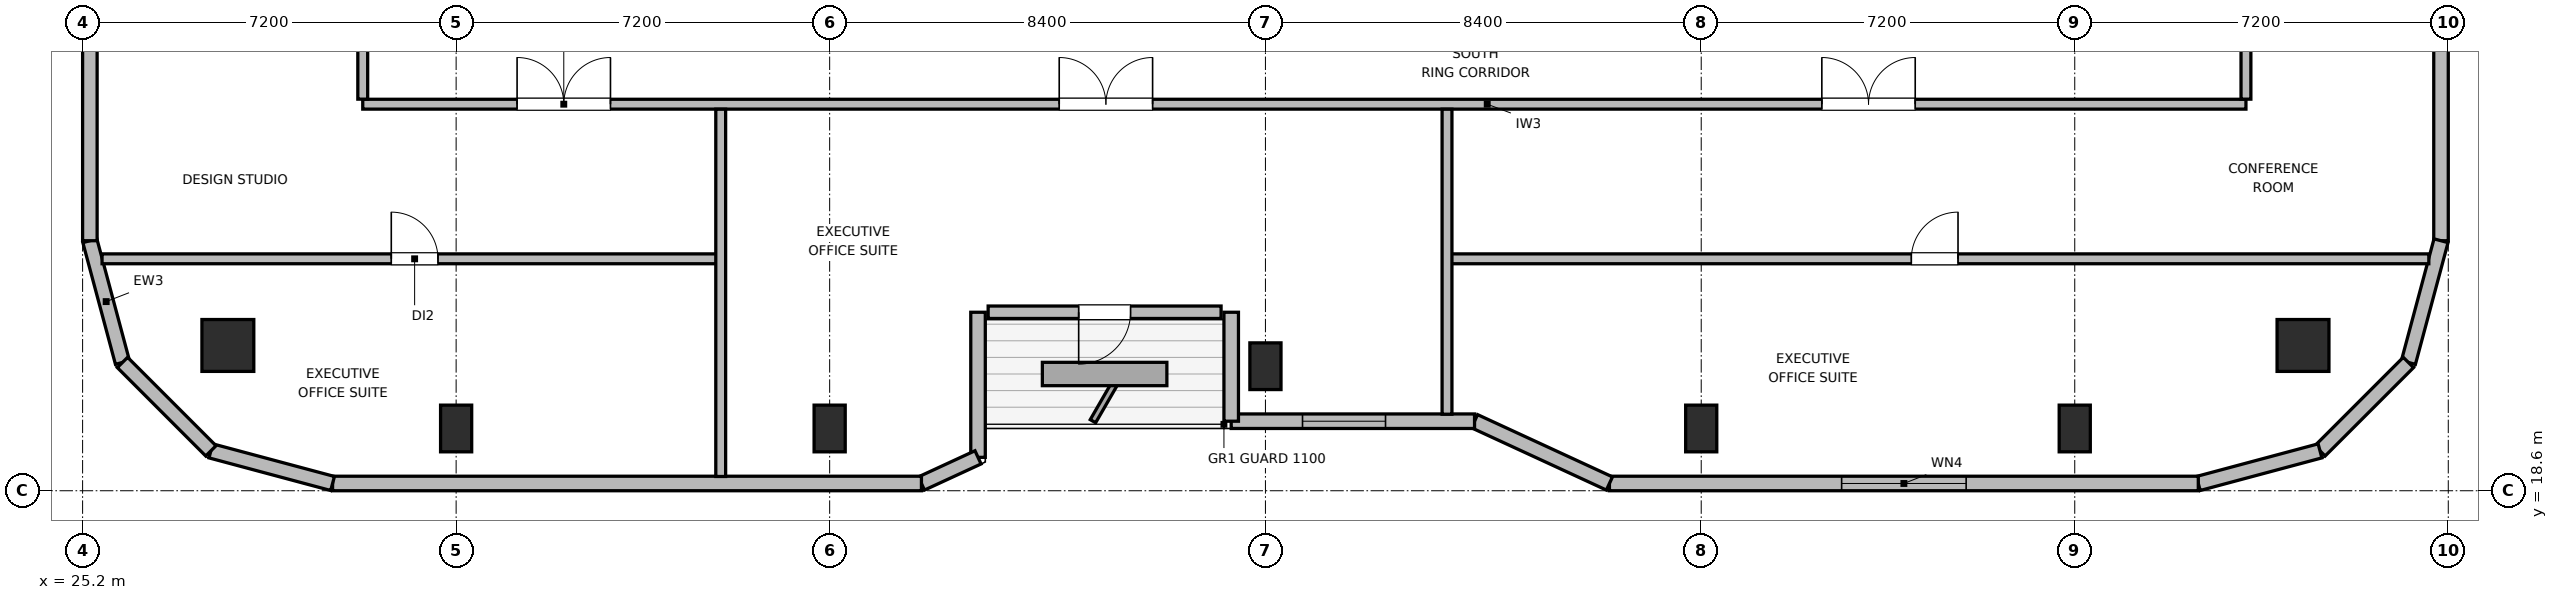
"""IFC4 building model, lengths in metres.
Left out: names, types, materials, properties, quantities, classifications, styles, units other than length and angle.
Written with IfcOpenShell. Run it as: python <this file> out.ifc"""

import sys

from ifc_helpers import new_model, si_unit, direction, frame, frame_2d, origin, origin_2d, place, context, subcontext, project, spatial, rectangle, circle, extrude, element, fill, save


model = new_model("IFC4")
c1 = context("Model", 3, precision=1e-05, world=origin(), true_north=direction((0.0, 1.0)))
c2 = subcontext(c1, "Body", "Model", "MODEL_VIEW")
j1 = project(units=[si_unit("LENGTHUNIT", "METRE"), si_unit("PLANEANGLEUNIT", "RADIAN")], contexts=[c1])
p1 = place(None, origin())
s1 = spatial("IfcSite", under=j1, at=p1, CompositionType="ELEMENT")
p2 = place(p1, origin())
s2 = spatial("IfcBuilding", under=s1, at=p2, CompositionType="ELEMENT")
p3 = place(p2, frame((0.0, 0.0, 325.8)))
s3 = spatial("IfcBuildingStorey", under=s2, at=p3, CompositionType="ELEMENT", Elevation=325.8)
for number, where, z_axis, x_axis in (
    (1, (28.0, 21.4, 0.0), (0.0, 0.0, 1.0), (1.0, 0.0, 0.0)),
    (2, (68.0, 21.4, 0.0), (0.0, 0.0, 1.0), (1.0, 0.0, 0.0)),
):
    element("IfcColumn", number, at=place(p3, frame(where, z_axis=z_axis, x_axis=x_axis)), inside=s3, PredefinedType="COLUMN", context=c2, shape_type="SweptSolid", body=[
        extrude(circle(Radius=0.5, at=origin_2d()), origin(), (0.0, 0.0, 1.0), 3.9),
    ])
for number, where, z_axis, x_axis in (
    (3, (32.4, 19.8, 0.0), (0.0, 0.0, 1.0), (1.0, 0.0, 0.0)),
    (4, (39.6, 19.8, 0.0), (0.0, 0.0, 1.0), (1.0, 0.0, 0.0)),
    (5, (48.0, 21.0, 0.0), (0.0, 0.0, 1.0), (1.0, 0.0, 0.0)),
    (6, (56.4, 19.8, 0.0), (0.0, 0.0, 1.0), (1.0, 0.0, 0.0)),
    (7, (63.6, 19.8, 0.0), (0.0, 0.0, 1.0), (1.0, 0.0, 0.0)),
):
    element("IfcColumn", number, at=place(p3, frame(where, z_axis=z_axis, x_axis=x_axis)), inside=s3, PredefinedType="COLUMN", context=c2, shape_type="SweptSolid", body=[
        extrude(rectangle(XDim=0.6, YDim=0.9, at=origin_2d()), origin(), (0.0, 0.0, 1.0), 3.9),
    ])
p4 = place(p3, frame((25.969, 21.073, 0.0), z_axis=(0.0, 0.0, 1.0), x_axis=(-0.258751159445, 0.965944013639, 0.0)))
e8 = element("IfcWall", 8, at=p4, inside=s3, PredefinedType="SOLIDWALL", context=c2, shape_type="SweptSolid", body=[
    extrude(rectangle(XDim=2.429, YDim=0.28, at=frame_2d((1.214, 0.0))), origin(), (0.0, 0.0, 1.0), 3.68),
])
p5 = place(p3, frame((25.34, 23.418, 0.0), z_axis=(0.0, 0.0, 1.0), x_axis=(0.0, 1.0, 0.0)))
e9 = element("IfcWall", 9, at=p5, inside=s3, PredefinedType="SOLIDWALL", context=c2, shape_type="SweptSolid", body=[
    extrude(rectangle(XDim=5.842, YDim=0.28, at=frame_2d((2.921, 0.0))), origin(), (0.0, 0.0, 1.0), 3.68),
])
p6 = place(p3, frame((70.66, 37.66, 0.0), z_axis=(0.0, 0.0, 1.0), x_axis=(0.0, -1.0, 0.0)))
e10 = element("IfcWall", 10, at=p6, inside=s3, PredefinedType="SOLIDWALL", context=c2, shape_type="SweptSolid", body=[
    extrude(rectangle(XDim=14.241, YDim=0.28, at=frame_2d((7.121, 0.0))), origin(), (0.0, 0.0, 1.0), 3.68),
])
p7 = place(p6, frame((6.456, 0.0, 0.85)))
e11 = element("IfcOpeningElement", 11, at=p7, cuts=e10, PredefinedType="OPENING", context=c2, shape_type="SweptSolid", body=[
    extrude(rectangle(XDim=1.6, YDim=1.0, at=frame_2d((0.8, 0.5))), frame((0.0, 0.15, 0.0), z_axis=(0.0, -1.0, 0.0), x_axis=(1.0, 0.0, 0.0)), (0.0, 0.0, 1.0), 0.3),
])
p8 = place(p3, frame((70.66, 23.418, 0.0), z_axis=(0.0, 0.0, 1.0), x_axis=(-0.258751159445, -0.965944013639, 0.0)))
e12 = element("IfcWall", 12, at=p8, inside=s3, PredefinedType="SOLIDWALL", context=c2, shape_type="SweptSolid", body=[
    extrude(rectangle(XDim=2.429, YDim=0.28, at=frame_2d((1.214, 0.0))), origin(), (0.0, 0.0, 1.0), 3.68),
])
p9 = place(p3, frame((70.031, 21.073, 0.0), z_axis=(0.0, 0.0, 1.0), x_axis=(-0.707106781187, -0.707106781187, 0.0)))
e13 = element("IfcWall", 13, at=p9, inside=s3, PredefinedType="SOLIDWALL", context=c2, shape_type="SweptSolid", body=[
    extrude(rectangle(XDim=2.41, YDim=0.28, at=frame_2d((1.205, 0.0))), origin(), (0.0, 0.0, 1.0), 3.68),
])
p10 = place(p3, frame((68.327, 19.368, 0.0), z_axis=(0.0, 0.0, 1.0), x_axis=(-0.965937282298, -0.25877628691, 0.0)))
e14 = element("IfcWall", 14, at=p10, inside=s3, PredefinedType="SOLIDWALL", context=c2, shape_type="SweptSolid", body=[
    extrude(rectangle(XDim=2.428, YDim=0.28, at=frame_2d((1.214, 0.0))), origin(), (0.0, 0.0, 1.0), 3.68),
])
p11 = place(p3, frame((65.982, 18.74, 0.0), z_axis=(0.0, 0.0, 1.0), x_axis=(-1.0, 0.0, 0.0)))
e15 = element("IfcWall", 15, at=p11, inside=s3, PredefinedType="SOLIDWALL", context=c2, shape_type="SweptSolid", body=[
    extrude(rectangle(XDim=11.351, YDim=0.28, at=frame_2d((5.676, 0.0))), origin(), (0.0, 0.0, 1.0), 3.68),
])
p12 = place(p11, frame((4.475, 0.0, 0.85)))
e16 = element("IfcOpeningElement", 16, at=p12, cuts=e15, PredefinedType="OPENING", context=c2, shape_type="SweptSolid", body=[
    extrude(rectangle(XDim=2.4, YDim=1.15, at=frame_2d((1.2, 0.575))), frame((0.0, 0.15, 0.0), z_axis=(0.0, -1.0, 0.0), x_axis=(1.0, 0.0, 0.0)), (0.0, 0.0, 1.0), 0.3),
])
p13 = place(p3, frame((54.631, 18.74, 0.0), z_axis=(0.0, 0.0, 1.0), x_axis=(-0.907956889006, 0.419063584324, 0.0)))
e17 = element("IfcWall", 17, at=p13, inside=s3, PredefinedType="SOLIDWALL", context=c2, shape_type="SweptSolid", body=[
    extrude(rectangle(XDim=2.864, YDim=0.28, at=frame_2d((1.432, 0.0))), origin(), (0.0, 0.0, 1.0), 2.265),
])
p14 = place(p3, frame((52.031, 19.94, 0.0), z_axis=(0.0, 0.0, 1.0), x_axis=(-1.0, 0.0, 0.0)))
e18 = element("IfcWall", 18, at=p14, inside=s3, PredefinedType="SOLIDWALL", context=c2, shape_type="SweptSolid", body=[
    extrude(rectangle(XDim=4.691, YDim=0.28, at=frame_2d((2.345, 0.0))), origin(), (0.0, 0.0, 1.0), 2.265),
])
p15 = place(p14, frame((1.716, 0.0, 0.85)))
e19 = element("IfcOpeningElement", 19, at=p15, cuts=e18, PredefinedType="OPENING", context=c2, shape_type="SweptSolid", body=[
    extrude(rectangle(XDim=1.6, YDim=1.0, at=frame_2d((0.8, 0.5))), frame((0.0, 0.15, 0.0), z_axis=(0.0, -1.0, 0.0), x_axis=(1.0, 0.0, 0.0)), (0.0, 0.0, 1.0), 0.3),
])
p16 = place(p3, frame((47.34, 19.94, 0.0), z_axis=(0.0, 0.0, 1.0), x_axis=(0.0, 1.0, 0.0)))
e20 = element("IfcWall", 20, at=p16, inside=s3, PredefinedType="SOLIDWALL", context=c2, shape_type="SweptSolid", body=[
    extrude(rectangle(XDim=2.1, YDim=0.28, at=frame_2d((1.05, 0.0))), origin(), (0.0, 0.0, 1.0), 2.265),
])
p17 = place(p3, frame((47.145, 22.04, 0.0), z_axis=(0.0, 0.0, 1.0), x_axis=(-1.0, 0.0, 0.0)))
e21 = element("IfcWall", 21, at=p17, inside=s3, PredefinedType="SOLIDWALL", context=c2, shape_type="SweptSolid", body=[
    extrude(rectangle(XDim=4.49, YDim=0.24, at=frame_2d((2.245, 0.0))), origin(), (0.0, 0.0, 1.0), 3.68),
])
p18 = place(p17, frame((1.745, 0.0, 0.0)))
e22 = element("IfcOpeningElement", 22, at=p18, cuts=e21, PredefinedType="OPENING", context=c2, shape_type="SweptSolid", body=[
    extrude(rectangle(XDim=1.0, YDim=2.02, at=frame_2d((0.5, 1.01))), frame((0.0, 0.13, 0.0), z_axis=(0.0, -1.0, 0.0), x_axis=(1.0, 0.0, 0.0)), (0.0, 0.0, 1.0), 0.26),
])
p19 = place(p3, frame((42.46, 22.04, 0.0), z_axis=(0.0, 0.0, 1.0), x_axis=(0.0, -1.0, 0.0)))
e23 = element("IfcWall", 23, at=p19, inside=s3, PredefinedType="SOLIDWALL", context=c2, shape_type="SweptSolid", body=[
    extrude(rectangle(XDim=2.796, YDim=0.28, at=frame_2d((1.398, 0.0))), origin(), (0.0, 0.0, 1.0), 2.265),
])
p20 = place(p3, frame((42.46, 19.244, 0.0), z_axis=(0.0, 0.0, 1.0), x_axis=(-0.907893953211, -0.419199916176, 0.0)))
e24 = element("IfcWall", 24, at=p20, inside=s3, PredefinedType="SOLIDWALL", context=c2, shape_type="SweptSolid", body=[
    extrude(rectangle(XDim=1.201, YDim=0.28, at=frame_2d((0.601, 0.0))), origin(), (0.0, 0.0, 1.0), 3.68),
])
p21 = place(p3, frame((41.369, 18.74, 0.0), z_axis=(0.0, 0.0, 1.0), x_axis=(-1.0, 0.0, 0.0)))
e25 = element("IfcWall", 25, at=p21, inside=s3, PredefinedType="SOLIDWALL", context=c2, shape_type="SweptSolid", body=[
    extrude(rectangle(XDim=11.351, YDim=0.28, at=frame_2d((5.675, 0.0))), origin(), (0.0, 0.0, 1.0), 3.68),
])
p22 = place(p3, frame((30.018, 18.74, 0.0), z_axis=(0.0, 0.0, 1.0), x_axis=(-0.965937282298, 0.25877628691, 0.0)))
e26 = element("IfcWall", 26, at=p22, inside=s3, PredefinedType="SOLIDWALL", context=c2, shape_type="SweptSolid", body=[
    extrude(rectangle(XDim=2.428, YDim=0.28, at=frame_2d((1.214, 0.0))), origin(), (0.0, 0.0, 1.0), 3.68),
])
p23 = place(p3, frame((27.673, 19.368, 0.0), z_axis=(0.0, 0.0, 1.0), x_axis=(-0.707106781187, 0.707106781187, 0.0)))
e27 = element("IfcWall", 27, at=p23, inside=s3, PredefinedType="SOLIDWALL", context=c2, shape_type="SweptSolid", body=[
    extrude(rectangle(XDim=2.41, YDim=0.28, at=frame_2d((1.205, 0.0))), origin(), (0.0, 0.0, 1.0), 3.68),
])
p24 = place(p3, frame((30.6, 26.05, 0.0), z_axis=(0.0, 0.0, 1.0), x_axis=(1.0, 0.0, 0.0)))
e28 = element("IfcWall", 28, at=p24, inside=s3, PredefinedType="PLUMBINGWALL", context=c2, shape_type="SweptSolid", body=[
    extrude(rectangle(XDim=36.3, YDim=0.19, at=frame_2d((18.15, 0.0))), origin(), (0.0, 0.0, 1.0), 3.68),
])
p25 = place(p24, frame((2.975, 0.0, 0.0)))
e29 = element("IfcOpeningElement", 29, at=p25, cuts=e28, PredefinedType="OPENING", context=c2, shape_type="SweptSolid", body=[
    extrude(rectangle(XDim=1.8, YDim=2.06, at=frame_2d((0.9, 1.03))), frame((0.0, 0.105, 0.0), z_axis=(0.0, -1.0, 0.0), x_axis=(1.0, 0.0, 0.0)), (0.0, 0.0, 1.0), 0.21),
])
p26 = place(p24, frame((13.425, 0.0, 0.0)))
e30 = element("IfcOpeningElement", 30, at=p26, cuts=e28, PredefinedType="OPENING", context=c2, shape_type="SweptSolid", body=[
    extrude(rectangle(XDim=1.8, YDim=2.06, at=frame_2d((0.9, 1.03))), frame((0.0, 0.105, 0.0), z_axis=(0.0, -1.0, 0.0), x_axis=(1.0, 0.0, 0.0)), (0.0, 0.0, 1.0), 0.21),
])
p27 = place(p24, frame((28.125, 0.0, 0.0)))
e31 = element("IfcOpeningElement", 31, at=p27, cuts=e28, PredefinedType="OPENING", context=c2, shape_type="SweptSolid", body=[
    extrude(rectangle(XDim=1.8, YDim=2.06, at=frame_2d((0.9, 1.03))), frame((0.0, 0.105, 0.0), z_axis=(0.0, -1.0, 0.0), x_axis=(1.0, 0.0, 0.0)), (0.0, 0.0, 1.0), 0.21),
])
p28 = place(p3, frame((30.6, 26.147, 0.0), z_axis=(0.0, 0.0, 1.0), x_axis=(0.0, 1.0, 0.0)))
e32 = element("IfcWall", 32, at=p28, inside=s3, PredefinedType="PLUMBINGWALL", context=c2, shape_type="SweptSolid", body=[
    extrude(rectangle(XDim=19.706, YDim=0.19, at=frame_2d((9.853, 0.0))), origin(), (0.0, 0.0, 1.0), 3.68),
])
p29 = place(p28, frame((4.003, 0.0, 0.0)))
e33 = element("IfcOpeningElement", 33, at=p29, cuts=e32, PredefinedType="OPENING", context=c2, shape_type="SweptSolid", body=[
    extrude(rectangle(XDim=0.95, YDim=2.04, at=frame_2d((0.475, 1.02))), frame((0.0, 0.105, 0.0), z_axis=(0.0, -1.0, 0.0), x_axis=(1.0, 0.0, 0.0)), (0.0, 0.0, 1.0), 0.21),
])
p30 = place(p28, frame((13.953, 0.0, 0.0)))
e34 = element("IfcOpeningElement", 34, at=p30, cuts=e32, PredefinedType="OPENING", context=c2, shape_type="SweptSolid", body=[
    extrude(rectangle(XDim=0.95, YDim=2.04, at=frame_2d((0.475, 1.02))), frame((0.0, 0.105, 0.0), z_axis=(0.0, -1.0, 0.0), x_axis=(1.0, 0.0, 0.0)), (0.0, 0.0, 1.0), 0.21),
])
p31 = place(p3, frame((66.9, 26.147, 0.0), z_axis=(0.0, 0.0, 1.0), x_axis=(0.0, 1.0, 0.0)))
e35 = element("IfcWall", 35, at=p31, inside=s3, PredefinedType="PLUMBINGWALL", context=c2, shape_type="SweptSolid", body=[
    extrude(rectangle(XDim=19.706, YDim=0.19, at=frame_2d((9.853, 0.0))), origin(), (0.0, 0.0, 1.0), 3.68),
])
p32 = place(p31, frame((5.003, 0.0, 0.0)))
e36 = element("IfcOpeningElement", 36, at=p32, cuts=e35, PredefinedType="OPENING", context=c2, shape_type="SweptSolid", body=[
    extrude(rectangle(XDim=0.95, YDim=2.04, at=frame_2d((0.475, 1.02))), frame((0.0, 0.105, 0.0), z_axis=(0.0, -1.0, 0.0), x_axis=(1.0, 0.0, 0.0)), (0.0, 0.0, 1.0), 0.21),
])
p33 = place(p31, frame((14.953, 0.0, 0.0)))
e37 = element("IfcOpeningElement", 37, at=p33, cuts=e35, PredefinedType="OPENING", context=c2, shape_type="SweptSolid", body=[
    extrude(rectangle(XDim=0.95, YDim=2.04, at=frame_2d((0.475, 1.02))), frame((0.0, 0.105, 0.0), z_axis=(0.0, -1.0, 0.0), x_axis=(1.0, 0.0, 0.0)), (0.0, 0.0, 1.0), 0.21),
])
p34 = place(p3, frame((25.575, 23.07, 0.0), z_axis=(0.0, 0.0, 1.0), x_axis=(1.0, 0.0, 0.0)))
e38 = element("IfcWall", 38, at=p34, inside=s3, PredefinedType="PLUMBINGWALL", context=c2, shape_type="SweptSolid", body=[
    extrude(rectangle(XDim=11.925, YDim=0.19, at=frame_2d((5.962, 0.0))), origin(), (0.0, 0.0, 1.0), 3.311),
])
p35 = place(p34, frame((5.575, 0.0, 0.0)))
e39 = element("IfcOpeningElement", 39, at=p35, cuts=e38, PredefinedType="OPENING", context=c2, shape_type="SweptSolid", body=[
    extrude(rectangle(XDim=0.9, YDim=2.02, at=frame_2d((0.45, 1.01))), frame((0.0, 0.105, 0.0), z_axis=(0.0, -1.0, 0.0), x_axis=(1.0, 0.0, 0.0)), (0.0, 0.0, 1.0), 0.21),
])
p36 = place(p3, frame((37.5, 18.875, 0.0), z_axis=(0.0, 0.0, 1.0), x_axis=(0.0, 1.0, 0.0)))
e40 = element("IfcWall", 40, at=p36, inside=s3, PredefinedType="PLUMBINGWALL", context=c2, shape_type="SweptSolid", body=[
    extrude(rectangle(XDim=7.078, YDim=0.19, at=frame_2d((3.539, 0.0))), origin(), (0.0, 0.0, 1.0), 3.68),
])
p37 = place(p3, frame((51.5, 23.07, 0.0), z_axis=(0.0, 0.0, 1.0), x_axis=(1.0, 0.0, 0.0)))
e41 = element("IfcWall", 41, at=p37, inside=s3, PredefinedType="PLUMBINGWALL", context=c2, shape_type="SweptSolid", body=[
    extrude(rectangle(XDim=18.925, YDim=0.19, at=frame_2d((9.462, 0.0))), origin(), (0.0, 0.0, 1.0), 3.311),
])
p38 = place(p37, frame((8.95, 0.0, 0.0)))
e42 = element("IfcOpeningElement", 42, at=p38, cuts=e41, PredefinedType="OPENING", context=c2, shape_type="SweptSolid", body=[
    extrude(rectangle(XDim=0.9, YDim=2.02, at=frame_2d((0.45, 1.01))), frame((0.0, 0.105, 0.0), z_axis=(0.0, -1.0, 0.0), x_axis=(1.0, 0.0, 0.0)), (0.0, 0.0, 1.0), 0.21),
])
p39 = place(p3, frame((51.5, 20.075, 0.0), z_axis=(0.0, 0.0, 1.0), x_axis=(0.0, 1.0, 0.0)))
e43 = element("IfcWall", 43, at=p39, inside=s3, PredefinedType="PLUMBINGWALL", context=c2, shape_type="SweptSolid", body=[
    extrude(rectangle(XDim=5.878, YDim=0.19, at=frame_2d((2.939, 0.0))), origin(), (0.0, 0.0, 1.0), 3.043),
])
p40 = place(p12, origin())
e44 = element("IfcWindow", 44, at=p40, inside=s3, PartitioningType="SINGLE_PANEL", PredefinedType="WINDOW", context=c2, shape_type="SweptSolid", body=[
    extrude(rectangle(XDim=2.4, YDim=1.15, at=frame_2d((1.2, 0.575))), frame((0.0, 0.03, 0.0), z_axis=(0.0, -1.0, 0.0), x_axis=(1.0, 0.0, 0.0)), (0.0, 0.0, 1.0), 0.06),
])
fill(e16, e44)
p41 = place(p15, origin())
e45 = element("IfcWindow", 45, at=p41, inside=s3, PartitioningType="SINGLE_PANEL", PredefinedType="WINDOW", context=c2, shape_type="SweptSolid", body=[
    extrude(rectangle(XDim=1.6, YDim=1.0, at=frame_2d((0.8, 0.5))), frame((0.0, 0.03, 0.0), z_axis=(0.0, -1.0, 0.0), x_axis=(1.0, 0.0, 0.0)), (0.0, 0.0, 1.0), 0.06),
])
fill(e19, e45)
p42 = place(p18, origin())
e46 = element("IfcDoor", 46, at=p42, inside=s3, OperationType="SINGLE_SWING_RIGHT", PredefinedType="DOOR", context=c2, shape_type="SweptSolid", body=[
    extrude(rectangle(XDim=1.0, YDim=2.02, at=frame_2d((0.5, 1.01))), frame((0.0, 0.025, 0.0), z_axis=(0.0, -1.0, 0.0), x_axis=(1.0, 0.0, 0.0)), (0.0, 0.0, 1.0), 0.05),
])
fill(e22, e46)
p43 = place(p35, origin())
e47 = element("IfcDoor", 47, at=p43, inside=s3, OperationType="SINGLE_SWING_LEFT", PredefinedType="DOOR", context=c2, shape_type="SweptSolid", body=[
    extrude(rectangle(XDim=0.9, YDim=2.02, at=frame_2d((0.45, 1.01))), frame((0.0, 0.025, 0.0), z_axis=(0.0, -1.0, 0.0), x_axis=(1.0, 0.0, 0.0)), (0.0, 0.0, 1.0), 0.05),
])
fill(e39, e47)
p44 = place(p25, origin())
e48 = element("IfcDoor", 48, at=p44, inside=s3, OperationType="DOUBLE_DOOR_SINGLE_SWING", PredefinedType="DOOR", context=c2, shape_type="SweptSolid", body=[
    extrude(rectangle(XDim=1.8, YDim=2.06, at=frame_2d((0.9, 1.03))), frame((0.0, 0.025, 0.0), z_axis=(0.0, -1.0, 0.0), x_axis=(1.0, 0.0, 0.0)), (0.0, 0.0, 1.0), 0.05),
])
fill(e29, e48)
p45 = place(p26, origin())
e49 = element("IfcDoor", 49, at=p45, inside=s3, OperationType="DOUBLE_DOOR_SINGLE_SWING", PredefinedType="DOOR", context=c2, shape_type="SweptSolid", body=[
    extrude(rectangle(XDim=1.8, YDim=2.06, at=frame_2d((0.9, 1.03))), frame((0.0, 0.025, 0.0), z_axis=(0.0, -1.0, 0.0), x_axis=(1.0, 0.0, 0.0)), (0.0, 0.0, 1.0), 0.05),
])
fill(e30, e49)
p46 = place(p38, origin())
e50 = element("IfcDoor", 50, at=p46, inside=s3, OperationType="SINGLE_SWING_RIGHT", PredefinedType="DOOR", context=c2, shape_type="SweptSolid", body=[
    extrude(rectangle(XDim=0.9, YDim=2.02, at=frame_2d((0.45, 1.01))), frame((0.0, 0.025, 0.0), z_axis=(0.0, -1.0, 0.0), x_axis=(1.0, 0.0, 0.0)), (0.0, 0.0, 1.0), 0.05),
])
fill(e42, e50)
p47 = place(p27, origin())
e51 = element("IfcDoor", 51, at=p47, inside=s3, OperationType="DOUBLE_DOOR_SINGLE_SWING", PredefinedType="DOOR", context=c2, shape_type="SweptSolid", body=[
    extrude(rectangle(XDim=1.8, YDim=2.06, at=frame_2d((0.9, 1.03))), frame((0.0, 0.025, 0.0), z_axis=(0.0, -1.0, 0.0), x_axis=(1.0, 0.0, 0.0)), (0.0, 0.0, 1.0), 0.05),
])
fill(e31, e51)
save(model, sys.argv[1])
